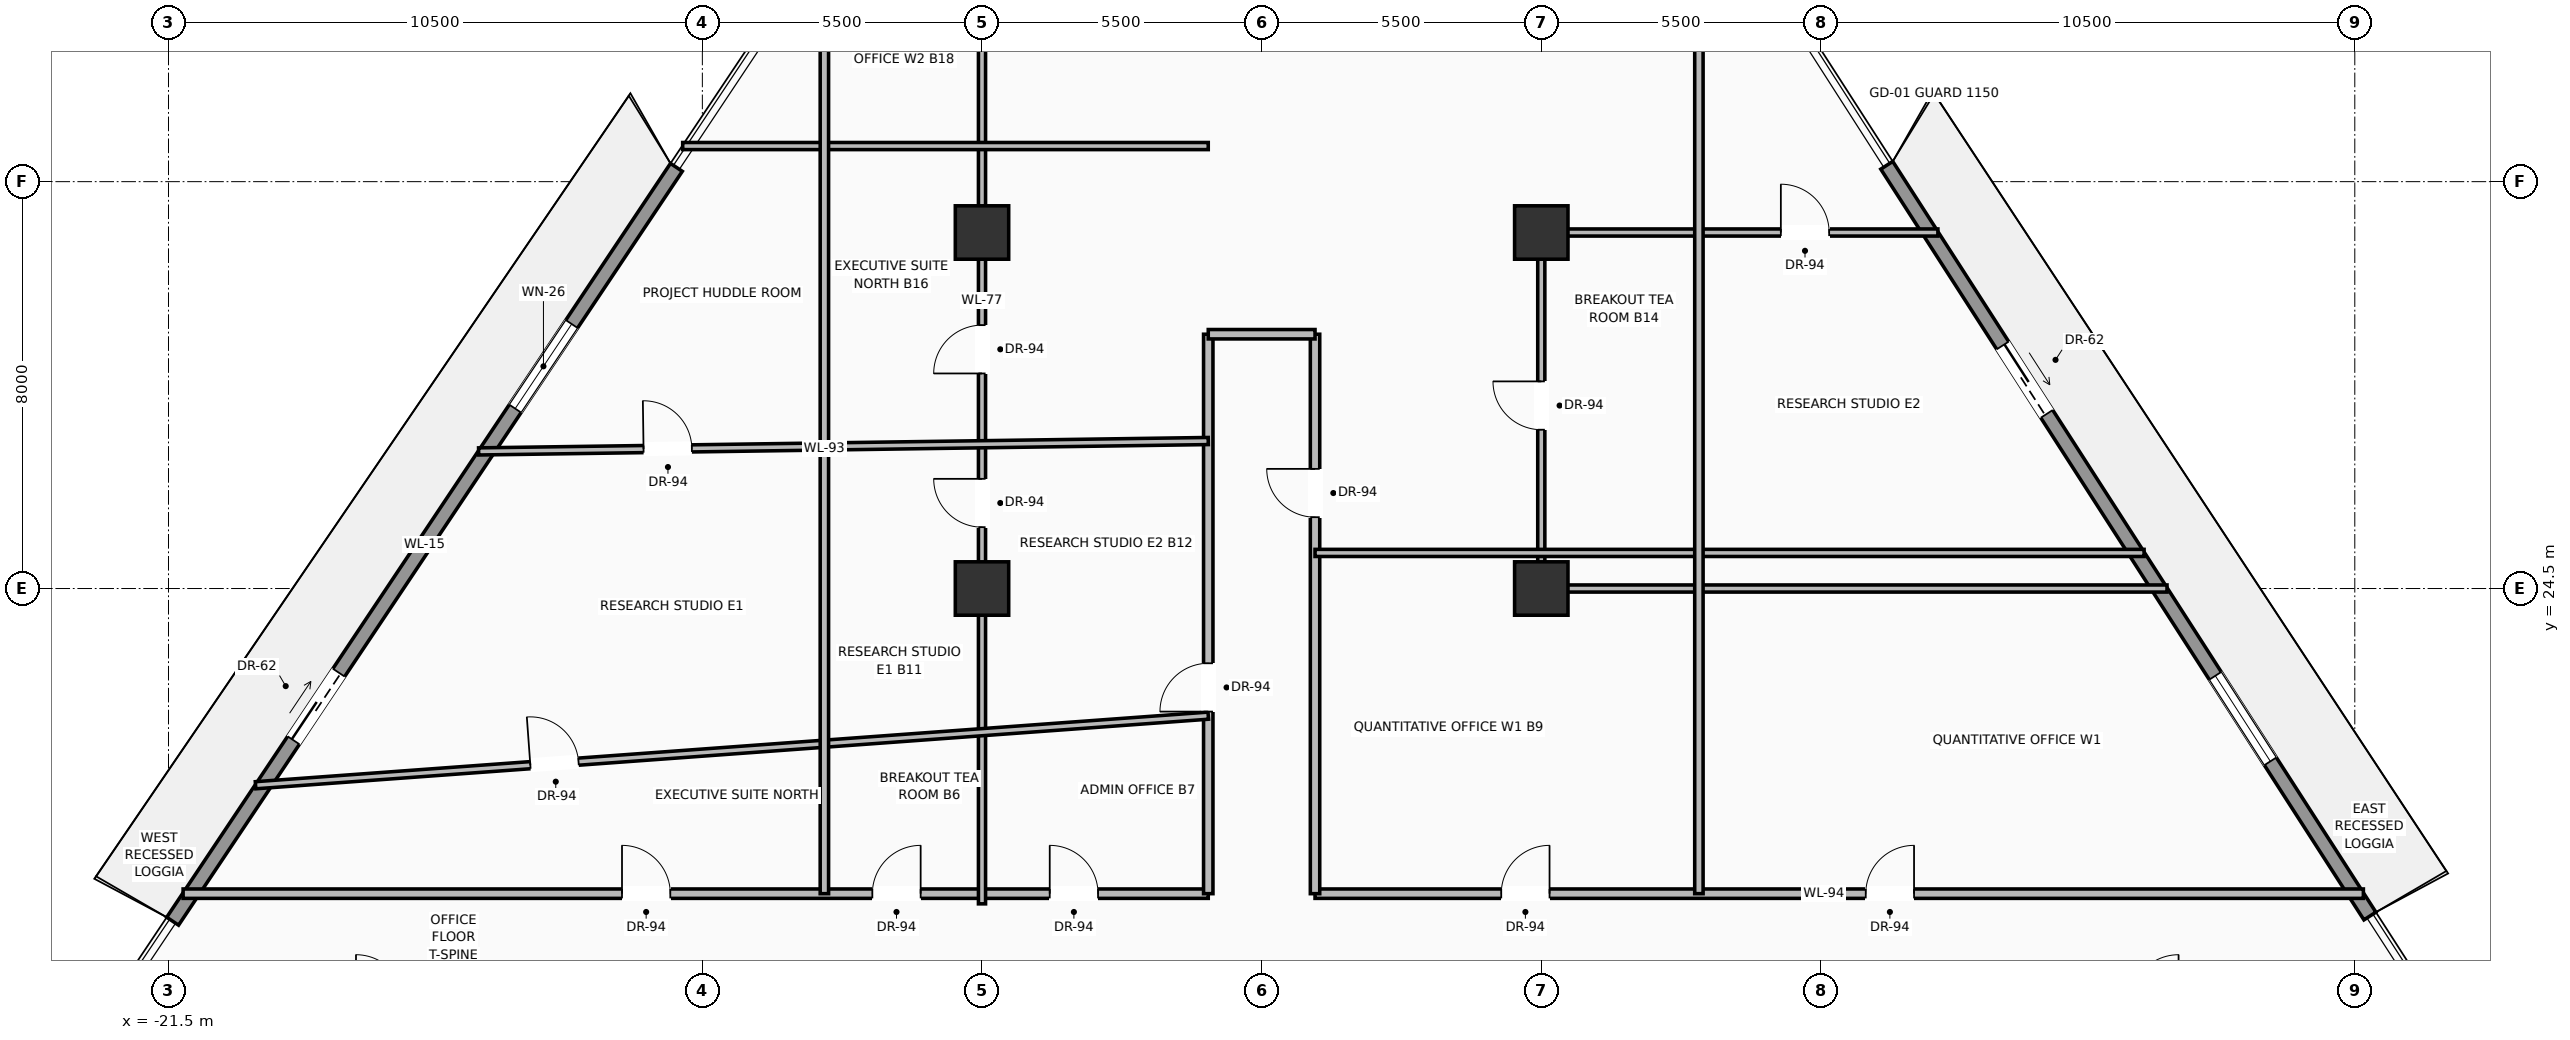
"""IFC4 building model, lengths in metres.
Left out: names, types, materials, properties, quantities, classifications, styles, units other than length and angle.
Written with IfcOpenShell. Run it as: python <this file> out.ifc"""

import sys

from ifc_helpers import new_model, si_unit, direction, frame, frame_2d, origin, origin_2d, place, context, subcontext, project, spatial, rectangle, extrude, source, transform, mapped, element, fill, save


model = new_model("IFC4")
c1 = context("Model", 3, precision=1e-05, world=origin(), true_north=direction((0.0, 1.0)))
c2 = subcontext(c1, "Body", "Model", "MODEL_VIEW")
j1 = project(units=[si_unit("LENGTHUNIT", "METRE"), si_unit("PLANEANGLEUNIT", "RADIAN")], contexts=[c1])
p1 = place(None, origin())
s1 = spatial("IfcSite", under=j1, at=p1, CompositionType="ELEMENT")
p2 = place(p1, origin())
s2 = spatial("IfcBuilding", under=s1, at=p2, CompositionType="ELEMENT")
p3 = place(p2, frame((0.0, 0.0, 106.2)))
s3 = spatial("IfcBuildingStorey", under=s2, at=p3, CompositionType="ELEMENT", Elevation=106.2)
m1 = source(origin(), c2, "Body", "SweptSolid", [
    extrude(rectangle(XDim=1.05, YDim=1.05, at=origin_2d()), origin(), (0.0, 0.0, 1.0), 3.7),
])
for number, where, z_axis, x_axis in (
    (1, (-5.5, 24.5, 0.0), (0.0, 0.0, 1.0), (1.0, 0.0, 0.0)),
    (2, (5.5, 24.5, 0.0), (0.0, 0.0, 1.0), (1.0, 0.0, 0.0)),
    (3, (-5.5, 31.5, 0.0), (0.0, 0.0, 1.0), (1.0, 0.0, 0.0)),
    (4, (5.5, 31.5, 0.0), (0.0, 0.0, 1.0), (1.0, 0.0, 0.0)),
):
    element("IfcColumn", number, at=place(p3, frame(where, z_axis=z_axis, x_axis=x_axis)), inside=s3, PredefinedType="COLUMN", context=c2, shape_type="MappedRepresentation", body=[
        mapped(m1, transform((0.0, 0.0, 0.0), scale=1.0)),
    ])
p4 = place(p3, frame((-21.418, 17.958, 0.0), z_axis=(0.0, 0.0, 1.0), x_axis=(0.555695210114, 0.83138609169, 0.0)))
e5 = element("IfcWall", 5, at=p4, inside=s3, PredefinedType="SOLIDWALL", context=c2, shape_type="SweptSolid", body=[
    extrude(rectangle(XDim=17.829, YDim=0.28, at=frame_2d((8.915, 0.0))), origin(), (0.0, 0.0, 1.0), 3.03),
])
p5 = place(p4, frame((4.279, 0.0, 0.0)))
e6 = element("IfcOpeningElement", 6, at=p5, cuts=e5, PredefinedType="OPENING", context=c2, shape_type="SweptSolid", body=[
    extrude(rectangle(XDim=1.6, YDim=2.35, at=frame_2d((0.8, 1.175))), frame((0.0, 0.15, 0.0), z_axis=(0.0, -1.0, 0.0), x_axis=(1.0, 0.0, 0.0)), (0.0, 0.0, 1.0), 0.3),
])
p6 = place(p4, frame((12.124, 0.0, 0.9)))
e7 = element("IfcOpeningElement", 7, at=p6, cuts=e5, PredefinedType="OPENING", context=c2, shape_type="SweptSolid", body=[
    extrude(rectangle(XDim=2.0, YDim=1.85, at=frame_2d((1.0, 0.925))), frame((0.0, 0.15, 0.0), z_axis=(0.0, -1.0, 0.0), x_axis=(1.0, 0.0, 0.0)), (0.0, 0.0, 1.0), 0.3),
])
p7 = place(p3, frame((12.295, 32.822, 0.0), z_axis=(0.0, 0.0, 1.0), x_axis=(0.54128181568, -0.84084124305, 0.0)))
e8 = element("IfcWall", 8, at=p7, inside=s3, PredefinedType="SOLIDWALL", context=c2, shape_type="SweptSolid", body=[
    extrude(rectangle(XDim=17.556, YDim=0.28, at=frame_2d((8.778, 0.0))), origin(), (0.0, 0.0, 1.0), 3.03),
])
p8 = place(p7, frame((4.213, 0.0, 0.0)))
e9 = element("IfcOpeningElement", 9, at=p8, cuts=e8, PredefinedType="OPENING", context=c2, shape_type="SweptSolid", body=[
    extrude(rectangle(XDim=1.6, YDim=2.35, at=frame_2d((0.8, 1.175))), frame((0.0, 0.15, 0.0), z_axis=(0.0, -1.0, 0.0), x_axis=(1.0, 0.0, 0.0)), (0.0, 0.0, 1.0), 0.3),
])
p9 = place(p7, frame((11.938, 0.0, 0.9)))
e10 = element("IfcOpeningElement", 10, at=p9, cuts=e8, PredefinedType="OPENING", context=c2, shape_type="SweptSolid", body=[
    extrude(rectangle(XDim=2.0, YDim=1.85, at=frame_2d((1.0, 0.925))), frame((0.0, 0.15, 0.0), z_axis=(0.0, -1.0, 0.0), x_axis=(1.0, 0.0, 0.0)), (0.0, 0.0, 1.0), 0.3),
])
p10 = place(p3, frame((-21.212, 18.5, 0.0), z_axis=(0.0, 0.0, 1.0), x_axis=(1.0, 0.0, 0.0)))
e11 = element("IfcWall", 11, at=p10, inside=s3, PredefinedType="PARTITIONING", context=c2, shape_type="SweptSolid", body=[
    extrude(rectangle(XDim=20.162, YDim=0.185, at=frame_2d((10.081, 0.0))), origin(), (0.0, 0.0, 1.0), 2.747),
])
p11 = place(p10, frame((8.632, 0.0, 0.0)))
e12 = element("IfcOpeningElement", 12, at=p11, cuts=e11, PredefinedType="OPENING", context=c2, shape_type="SweptSolid", body=[
    extrude(rectangle(XDim=0.95, YDim=2.2, at=frame_2d((0.475, 1.1))), frame((0.0, 0.103, 0.0), z_axis=(0.0, -1.0, 0.0), x_axis=(1.0, 0.0, 0.0)), (0.0, 0.0, 1.0), 0.205),
])
p12 = place(p10, frame((13.556, 0.0, 0.0)))
e13 = element("IfcOpeningElement", 13, at=p12, cuts=e11, PredefinedType="OPENING", context=c2, shape_type="SweptSolid", body=[
    extrude(rectangle(XDim=0.95, YDim=2.2, at=frame_2d((0.475, 1.1))), frame((0.0, 0.103, 0.0), z_axis=(0.0, -1.0, 0.0), x_axis=(1.0, 0.0, 0.0)), (0.0, 0.0, 1.0), 0.205),
])
p13 = place(p10, frame((17.045, 0.0, 0.0)))
e14 = element("IfcOpeningElement", 14, at=p13, cuts=e11, PredefinedType="OPENING", context=c2, shape_type="SweptSolid", body=[
    extrude(rectangle(XDim=0.95, YDim=2.2, at=frame_2d((0.475, 1.1))), frame((0.0, 0.103, 0.0), z_axis=(0.0, -1.0, 0.0), x_axis=(1.0, 0.0, 0.0)), (0.0, 0.0, 1.0), 0.205),
])
p14 = place(p3, frame((1.05, 18.5, 0.0), z_axis=(0.0, 0.0, 1.0), x_axis=(1.0, 0.0, 0.0)))
e15 = element("IfcWall", 15, at=p14, inside=s3, PredefinedType="PARTITIONING", context=c2, shape_type="SweptSolid", body=[
    extrude(rectangle(XDim=20.619, YDim=0.185, at=frame_2d((10.31, 0.0))), origin(), (0.0, 0.0, 1.0), 2.747),
])
p15 = place(p14, frame((10.831, 0.0, 0.0)))
e16 = element("IfcOpeningElement", 16, at=p15, cuts=e15, PredefinedType="OPENING", context=c2, shape_type="SweptSolid", body=[
    extrude(rectangle(XDim=0.95, YDim=2.2, at=frame_2d((0.475, 1.1))), frame((0.0, 0.103, 0.0), z_axis=(0.0, -1.0, 0.0), x_axis=(1.0, 0.0, 0.0)), (0.0, 0.0, 1.0), 0.205),
])
p16 = place(p14, frame((3.662, 0.0, 0.0)))
e17 = element("IfcOpeningElement", 17, at=p16, cuts=e15, PredefinedType="OPENING", context=c2, shape_type="SweptSolid", body=[
    extrude(rectangle(XDim=0.95, YDim=2.2, at=frame_2d((0.475, 1.1))), frame((0.0, 0.103, 0.0), z_axis=(0.0, -1.0, 0.0), x_axis=(1.0, 0.0, 0.0)), (0.0, 0.0, 1.0), 0.205),
])
p17 = place(p3, frame((-1.05, 18.5, 0.0), z_axis=(0.0, 0.0, 1.0), x_axis=(0.0, 1.0, 0.0)))
e18 = element("IfcWall", 18, at=p17, inside=s3, PredefinedType="PARTITIONING", context=c2, shape_type="SweptSolid", body=[
    extrude(rectangle(XDim=11.0, YDim=0.185, at=frame_2d((5.5, 0.0))), origin(), (0.0, 0.0, 1.0), 2.747),
])
p18 = place(p17, frame((3.58, 0.0, 0.0)))
e19 = element("IfcOpeningElement", 19, at=p18, cuts=e18, PredefinedType="OPENING", context=c2, shape_type="SweptSolid", body=[
    extrude(rectangle(XDim=0.95, YDim=2.2, at=frame_2d((0.475, 1.1))), frame((0.0, 0.103, 0.0), z_axis=(0.0, -1.0, 0.0), x_axis=(1.0, 0.0, 0.0)), (0.0, 0.0, 1.0), 0.205),
])
p19 = place(p3, frame((1.05, 18.5, 0.0), z_axis=(0.0, 0.0, 1.0), x_axis=(0.0, 1.0, 0.0)))
e20 = element("IfcWall", 20, at=p19, inside=s3, PredefinedType="PARTITIONING", context=c2, shape_type="SweptSolid", body=[
    extrude(rectangle(XDim=11.0, YDim=0.185, at=frame_2d((5.5, 0.0))), origin(), (0.0, 0.0, 1.0), 2.747),
])
p20 = place(p19, frame((7.403, 0.0, 0.0)))
e21 = element("IfcOpeningElement", 21, at=p20, cuts=e20, PredefinedType="OPENING", context=c2, shape_type="SweptSolid", body=[
    extrude(rectangle(XDim=0.95, YDim=2.2, at=frame_2d((0.475, 1.1))), frame((0.0, 0.103, 0.0), z_axis=(0.0, -1.0, 0.0), x_axis=(1.0, 0.0, 0.0)), (0.0, 0.0, 1.0), 0.205),
])
p21 = place(p3, frame((-1.05, 29.5, 0.0), z_axis=(0.0, 0.0, 1.0), x_axis=(1.0, 0.0, 0.0)))
e22 = element("IfcWall", 22, at=p21, inside=s3, PredefinedType="PARTITIONING", context=c2, shape_type="SweptSolid", body=[
    extrude(rectangle(XDim=2.1, YDim=0.185, at=frame_2d((1.05, 0.0))), origin(), (0.0, 0.0, 1.0), 3.442),
])
p22 = place(p3, frame((-5.5, 18.3, 0.0), z_axis=(0.0, 0.0, 1.0), x_axis=(0.0, 1.0, 0.0)))
e23 = element("IfcWall", 23, at=p22, inside=s3, PredefinedType="PARTITIONING", context=c2, shape_type="SweptSolid", body=[
    extrude(rectangle(XDim=23.708, YDim=0.14, at=frame_2d((11.854, 0.0))), origin(), (0.0, 0.0, 1.0), 2.747),
])
p23 = place(p22, frame((7.406, 0.0, 0.0)))
e24 = element("IfcOpeningElement", 24, at=p23, cuts=e23, PredefinedType="OPENING", context=c2, shape_type="SweptSolid", body=[
    extrude(rectangle(XDim=0.95, YDim=2.2, at=frame_2d((0.475, 1.1))), frame((0.0, 0.08, 0.0), z_axis=(0.0, -1.0, 0.0), x_axis=(1.0, 0.0, 0.0)), (0.0, 0.0, 1.0), 0.16),
])
p24 = place(p22, frame((10.429, 0.0, 0.0)))
e25 = element("IfcOpeningElement", 25, at=p24, cuts=e23, PredefinedType="OPENING", context=c2, shape_type="SweptSolid", body=[
    extrude(rectangle(XDim=0.95, YDim=2.2, at=frame_2d((0.475, 1.1))), frame((0.0, 0.08, 0.0), z_axis=(0.0, -1.0, 0.0), x_axis=(1.0, 0.0, 0.0)), (0.0, 0.0, 1.0), 0.16),
])
p25 = place(p22, frame((18.361, 0.0, 0.0)))
e26 = element("IfcOpeningElement", 26, at=p25, cuts=e23, PredefinedType="OPENING", context=c2, shape_type="SweptSolid", body=[
    extrude(rectangle(XDim=0.95, YDim=2.2, at=frame_2d((0.475, 1.1))), frame((0.0, 0.08, 0.0), z_axis=(0.0, -1.0, 0.0), x_axis=(1.0, 0.0, 0.0)), (0.0, 0.0, 1.0), 0.16),
])
p26 = place(p3, frame((5.5, 24.5, 0.0), z_axis=(0.0, 0.0, 1.0), x_axis=(1.0, 0.0, 0.0)))
e27 = element("IfcWall", 27, at=p26, inside=s3, PredefinedType="PARTITIONING", context=c2, shape_type="SweptSolid", body=[
    extrude(rectangle(XDim=12.306, YDim=0.14, at=frame_2d((6.153, 0.0))), origin(), (0.0, 0.0, 1.0), 2.747),
])
p27 = place(p3, frame((5.5, 24.5, 0.0), z_axis=(0.0, 0.0, 1.0), x_axis=(0.0, 1.0, 0.0)))
e28 = element("IfcWall", 28, at=p27, inside=s3, PredefinedType="PARTITIONING", context=c2, shape_type="SweptSolid", body=[
    extrude(rectangle(XDim=7.0, YDim=0.14, at=frame_2d((3.5, 0.0))), origin(), (0.0, 0.0, 1.0), 2.747),
])
p28 = place(p27, frame((3.123, 0.0, 0.0)))
e29 = element("IfcOpeningElement", 29, at=p28, cuts=e28, PredefinedType="OPENING", context=c2, shape_type="SweptSolid", body=[
    extrude(rectangle(XDim=0.95, YDim=2.2, at=frame_2d((0.475, 1.1))), frame((0.0, 0.08, 0.0), z_axis=(0.0, -1.0, 0.0), x_axis=(1.0, 0.0, 0.0)), (0.0, 0.0, 1.0), 0.16),
])
p29 = place(p3, frame((5.5, 31.5, 0.0), z_axis=(0.0, 0.0, 1.0), x_axis=(1.0, 0.0, 0.0)))
e30 = element("IfcWall", 30, at=p29, inside=s3, PredefinedType="PARTITIONING", context=c2, shape_type="SweptSolid", body=[
    extrude(rectangle(XDim=7.8, YDim=0.14, at=frame_2d((3.9, 0.0))), origin(), (0.0, 0.0, 1.0), 2.747),
])
p30 = place(p29, frame((4.712, 0.0, 0.0)))
e31 = element("IfcOpeningElement", 31, at=p30, cuts=e30, PredefinedType="OPENING", context=c2, shape_type="SweptSolid", body=[
    extrude(rectangle(XDim=0.95, YDim=2.2, at=frame_2d((0.475, 1.1))), frame((0.0, 0.08, 0.0), z_axis=(0.0, -1.0, 0.0), x_axis=(1.0, 0.0, 0.0)), (0.0, 0.0, 1.0), 0.16),
])
p31 = place(p3, frame((-19.788, 20.632, 0.0), z_axis=(0.0, 0.0, 1.0), x_axis=(0.99734485374, 0.072823366563, 0.0)))
e32 = element("IfcWall", 32, at=p31, inside=s3, PredefinedType="PARTITIONING", context=c2, shape_type="SweptSolid", body=[
    extrude(rectangle(XDim=18.787, YDim=0.14, at=frame_2d((9.394, 0.0))), origin(), (0.0, 0.0, 1.0), 2.747),
])
p32 = place(p31, frame((5.419, 0.0, 0.0)))
e33 = element("IfcOpeningElement", 33, at=p32, cuts=e32, PredefinedType="OPENING", context=c2, shape_type="SweptSolid", body=[
    extrude(rectangle(XDim=0.95, YDim=2.2, at=frame_2d((0.475, 1.1))), frame((0.0, 0.08, 0.0), z_axis=(0.0, -1.0, 0.0), x_axis=(1.0, 0.0, 0.0)), (0.0, 0.0, 1.0), 0.16),
])
p33 = place(p3, frame((-15.4, 27.196, 0.0), z_axis=(0.0, 0.0, 1.0), x_axis=(0.999898629756, 0.014238336023, 0.0)))
e34 = element("IfcWall", 34, at=p33, inside=s3, PredefinedType="PARTITIONING", context=c2, shape_type="SweptSolid", body=[
    extrude(rectangle(XDim=14.352, YDim=0.14, at=frame_2d((7.176, 0.0))), origin(), (0.0, 0.0, 1.0), 2.747),
])
p34 = place(p33, frame((3.244, 0.0, 0.0)))
e35 = element("IfcOpeningElement", 35, at=p34, cuts=e34, PredefinedType="OPENING", context=c2, shape_type="SweptSolid", body=[
    extrude(rectangle(XDim=0.95, YDim=2.2, at=frame_2d((0.475, 1.1))), frame((0.0, 0.08, 0.0), z_axis=(0.0, -1.0, 0.0), x_axis=(1.0, 0.0, 0.0)), (0.0, 0.0, 1.0), 0.16),
])
p35 = place(p3, frame((-11.387, 33.2, 0.0), z_axis=(0.0, 0.0, 1.0), x_axis=(1.0, 0.0, 0.0)))
e36 = element("IfcWall", 36, at=p35, inside=s3, PredefinedType="PARTITIONING", context=c2, shape_type="SweptSolid", body=[
    extrude(rectangle(XDim=10.337, YDim=0.14, at=frame_2d((5.168, 0.0))), origin(), (0.0, 0.0, 1.0), 2.747),
])
p36 = place(p3, frame((1.05, 25.2, 0.0), z_axis=(0.0, 0.0, 1.0), x_axis=(1.0, 0.0, 0.0)))
e37 = element("IfcWall", 37, at=p36, inside=s3, PredefinedType="PARTITIONING", context=c2, shape_type="SweptSolid", body=[
    extrude(rectangle(XDim=16.306, YDim=0.14, at=frame_2d((8.153, 0.0))), origin(), (0.0, 0.0, 1.0), 2.747),
])
for number, where, z_axis, x_axis in (
    (38, (-8.6, 18.5, 0.0), (0.0, 0.0, 1.0), (0.0, 1.0, 0.0)),
    (39, (8.6, 18.5, 0.0), (0.0, 0.0, 1.0), (0.0, 1.0, 0.0)),
):
    element("IfcWall", number, at=place(p3, frame(where, z_axis=z_axis, x_axis=x_axis)), inside=s3, PredefinedType="PARTITIONING", context=c2, shape_type="SweptSolid", body=[
        extrude(rectangle(XDim=17.5, YDim=0.165, at=frame_2d((8.75, 0.0))), origin(), (0.0, 0.0, 1.0), 2.747),
    ])
m2 = source(origin(), c2, "Body", "SweptSolid", [
    extrude(rectangle(XDim=1.6, YDim=2.35, at=frame_2d((0.8, 1.175))), frame((0.0, 0.025, 0.0), z_axis=(0.0, -1.0, 0.0), x_axis=(1.0, 0.0, 0.0)), (0.0, 0.0, 1.0), 0.05),
])
p37 = place(p5, origin())
e40 = element("IfcDoor", 40, at=p37, inside=s3, OperationType="SLIDING_TO_LEFT", PredefinedType="DOOR", context=c2, shape_type="MappedRepresentation", body=[
    mapped(m2, transform((0.0, 0.0, 0.0), scale=1.0)),
])
fill(e6, e40)
m3 = source(origin(), c2, "Body", "SweptSolid", [
    extrude(rectangle(XDim=2.0, YDim=1.85, at=frame_2d((1.0, 0.925))), frame((0.0, 0.03, 0.0), z_axis=(0.0, -1.0, 0.0), x_axis=(1.0, 0.0, 0.0)), (0.0, 0.0, 1.0), 0.06),
])
p38 = place(p6, origin())
e41 = element("IfcWindow", 41, at=p38, inside=s3, PartitioningType="SINGLE_PANEL", PredefinedType="WINDOW", context=c2, shape_type="MappedRepresentation", body=[
    mapped(m3, transform((0.0, 0.0, 0.0), scale=1.0)),
])
fill(e7, e41)
p39 = place(p8, origin())
e42 = element("IfcDoor", 42, at=p39, inside=s3, OperationType="SLIDING_TO_RIGHT", PredefinedType="DOOR", context=c2, shape_type="MappedRepresentation", body=[
    mapped(m2, transform((0.0, 0.0, 0.0), scale=1.0)),
])
fill(e9, e42)
p40 = place(p9, origin())
e43 = element("IfcWindow", 43, at=p40, inside=s3, PartitioningType="SINGLE_PANEL", PredefinedType="WINDOW", context=c2, shape_type="MappedRepresentation", body=[
    mapped(m3, transform((0.0, 0.0, 0.0), scale=1.0)),
])
fill(e10, e43)
m4 = source(origin(), c2, "Body", "SweptSolid", [
    extrude(rectangle(XDim=0.95, YDim=2.2, at=frame_2d((0.475, 1.1))), frame((0.0, 0.025, 0.0), z_axis=(0.0, -1.0, 0.0), x_axis=(1.0, 0.0, 0.0)), (0.0, 0.0, 1.0), 0.05),
])
p41 = place(p11, origin())
e44 = element("IfcDoor", 44, at=p41, inside=s3, OperationType="SINGLE_SWING_LEFT", PredefinedType="DOOR", context=c2, shape_type="MappedRepresentation", body=[
    mapped(m4, transform((0.0, 0.0, 0.0), scale=1.0)),
])
fill(e12, e44)
p42 = place(p15, origin())
e45 = element("IfcDoor", 45, at=p42, inside=s3, OperationType="SINGLE_SWING_RIGHT", PredefinedType="DOOR", context=c2, shape_type="MappedRepresentation", body=[
    mapped(m4, transform((0.0, 0.0, 0.0), scale=1.0)),
])
fill(e16, e45)
p43 = place(p18, origin())
e46 = element("IfcDoor", 46, at=p43, inside=s3, OperationType="SINGLE_SWING_LEFT", PredefinedType="DOOR", context=c2, shape_type="MappedRepresentation", body=[
    mapped(m4, transform((0.0, 0.0, 0.0), scale=1.0)),
])
fill(e19, e46)
p44 = place(p20, origin())
e47 = element("IfcDoor", 47, at=p44, inside=s3, OperationType="SINGLE_SWING_RIGHT", PredefinedType="DOOR", context=c2, shape_type="MappedRepresentation", body=[
    mapped(m4, transform((0.0, 0.0, 0.0), scale=1.0)),
])
fill(e21, e47)
p45 = place(p12, origin())
e48 = element("IfcDoor", 48, at=p45, inside=s3, OperationType="SINGLE_SWING_RIGHT", PredefinedType="DOOR", context=c2, shape_type="MappedRepresentation", body=[
    mapped(m4, transform((0.0, 0.0, 0.0), scale=1.0)),
])
fill(e13, e48)
p46 = place(p13, origin())
e49 = element("IfcDoor", 49, at=p46, inside=s3, OperationType="SINGLE_SWING_LEFT", PredefinedType="DOOR", context=c2, shape_type="MappedRepresentation", body=[
    mapped(m4, transform((0.0, 0.0, 0.0), scale=1.0)),
])
fill(e14, e49)
p47 = place(p16, origin())
e50 = element("IfcDoor", 50, at=p47, inside=s3, OperationType="SINGLE_SWING_RIGHT", PredefinedType="DOOR", context=c2, shape_type="MappedRepresentation", body=[
    mapped(m4, transform((0.0, 0.0, 0.0), scale=1.0)),
])
fill(e17, e50)
p48 = place(p32, origin())
e51 = element("IfcDoor", 51, at=p48, inside=s3, OperationType="SINGLE_SWING_LEFT", PredefinedType="DOOR", context=c2, shape_type="MappedRepresentation", body=[
    mapped(m4, transform((0.0, 0.0, 0.0), scale=1.0)),
])
fill(e33, e51)
p49 = place(p23, origin())
e52 = element("IfcDoor", 52, at=p49, inside=s3, OperationType="SINGLE_SWING_RIGHT", PredefinedType="DOOR", context=c2, shape_type="MappedRepresentation", body=[
    mapped(m4, transform((0.0, 0.0, 0.0), scale=1.0)),
])
fill(e24, e52)
p50 = place(p30, origin())
e53 = element("IfcDoor", 53, at=p50, inside=s3, OperationType="SINGLE_SWING_LEFT", PredefinedType="DOOR", context=c2, shape_type="MappedRepresentation", body=[
    mapped(m4, transform((0.0, 0.0, 0.0), scale=1.0)),
])
fill(e31, e53)
p51 = place(p28, origin())
e54 = element("IfcDoor", 54, at=p51, inside=s3, OperationType="SINGLE_SWING_RIGHT", PredefinedType="DOOR", context=c2, shape_type="MappedRepresentation", body=[
    mapped(m4, transform((0.0, 0.0, 0.0), scale=1.0)),
])
fill(e29, e54)
p52 = place(p24, origin())
e55 = element("IfcDoor", 55, at=p52, inside=s3, OperationType="SINGLE_SWING_LEFT", PredefinedType="DOOR", context=c2, shape_type="MappedRepresentation", body=[
    mapped(m4, transform((0.0, 0.0, 0.0), scale=1.0)),
])
fill(e25, e55)
p53 = place(p34, origin())
e56 = element("IfcDoor", 56, at=p53, inside=s3, OperationType="SINGLE_SWING_LEFT", PredefinedType="DOOR", context=c2, shape_type="MappedRepresentation", body=[
    mapped(m4, transform((0.0, 0.0, 0.0), scale=1.0)),
])
fill(e35, e56)
save(model, sys.argv[1])
